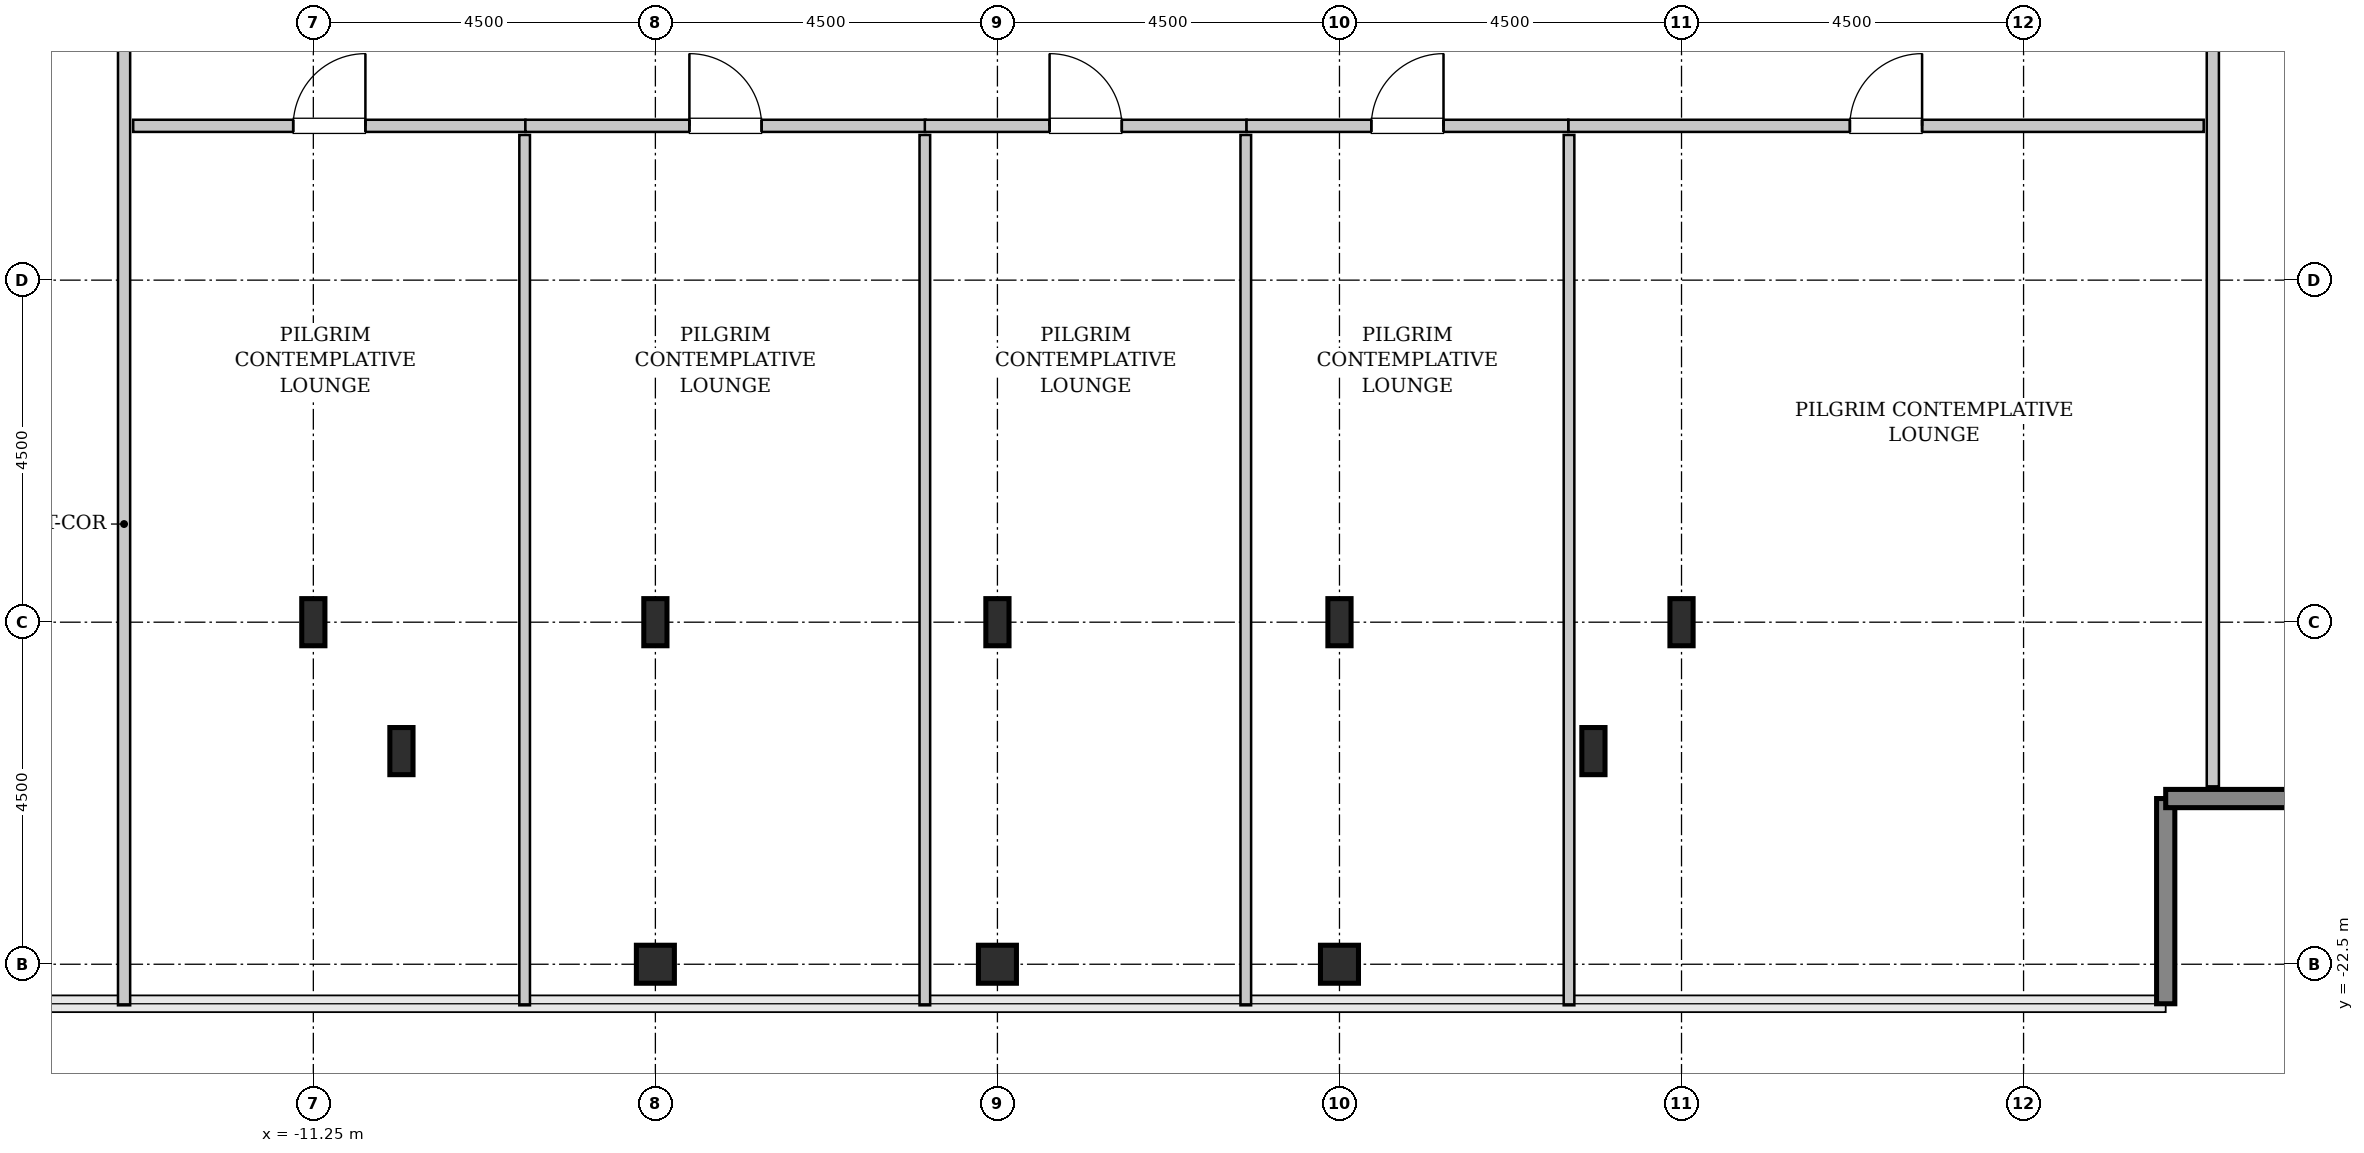
"""IFC4 building model, lengths in metres.
Left out: names, types, materials, properties, quantities, classifications, styles, units other than length and angle.
Written with IfcOpenShell. Run it as: python <this file> out.ifc"""

import sys

from ifc_helpers import new_model, si_unit, direction, frame, frame_2d, origin, origin_2d, place, context, subcontext, project, spatial, rectangle, hollow_rectangle, i_section, extrude, source, transform, mapped, element, fill, save


model = new_model("IFC4")
c1 = context("Model", 3, precision=1e-05, world=origin(), true_north=direction((0.0, 1.0)))
c2 = subcontext(c1, "Body", "Model", "MODEL_VIEW")
j1 = project(units=[si_unit("LENGTHUNIT", "METRE"), si_unit("PLANEANGLEUNIT", "RADIAN")], contexts=[c1])
p1 = place(None, origin())
s1 = spatial("IfcSite", under=j1, at=p1, CompositionType="ELEMENT")
p2 = place(p1, origin())
s2 = spatial("IfcBuilding", under=s1, at=p2, CompositionType="ELEMENT")
p3 = place(p2, frame((0.0, 0.0, 330.0)))
s3 = spatial("IfcBuildingStorey", under=s2, at=p3, CompositionType="ELEMENT", Elevation=330.0)
m1 = source(origin(), c2, "Body", "SweptSolid", [
    extrude(i_section(OverallWidth=0.305, OverallDepth=0.62, WebThickness=0.021, FlangeThickness=0.04, FilletRadius=0.027, at=origin_2d()), origin(), (0.0, 0.0, 1.0), 3.8),
])
for number, where, z_axis, x_axis in (
    (1, (-11.25, -18.0, 0.0), (0.0, 0.0, 1.0), (1.0, 0.0, 0.0)),
    (2, (-10.091, -19.696, 0.0), (0.0, 0.0, 1.0), (1.0, 0.0, 0.0)),
):
    element("IfcColumn", number, at=place(p3, frame(where, z_axis=z_axis, x_axis=x_axis)), inside=s3, PredefinedType="COLUMN", context=c2, shape_type="MappedRepresentation", body=[
        mapped(m1, transform((0.0, 0.0, 0.0), x_axis=(1.0, 0.0, 0.0), y_axis=(0.0, 1.0, 0.0), z_axis=(0.0, 0.0, 1.0), scale=1.0)),
    ])
m2 = source(origin(), c2, "Body", "SweptSolid", [
    extrude(hollow_rectangle(XDim=0.5, YDim=0.5, WallThickness=0.025, InnerFilletRadius=0.025, OuterFilletRadius=0.05, at=origin_2d()), origin(), (0.0, 0.0, 1.0), 3.8),
])
p4 = place(p3, frame((-6.75, -22.5, 0.0), z_axis=(0.0, 0.0, 1.0), x_axis=(1.0, 0.0, 0.0)))
e3 = element("IfcColumn", 3, at=p4, inside=s3, PredefinedType="COLUMN", context=c2, shape_type="MappedRepresentation", body=[
    mapped(m2, transform((0.0, 0.0, 0.0), x_axis=(1.0, 0.0, 0.0), y_axis=(0.0, 1.0, 0.0), z_axis=(0.0, 0.0, 1.0), scale=1.0)),
])
p5 = place(p3, frame((-6.75, -18.0, 0.0), z_axis=(0.0, 0.0, 1.0), x_axis=(1.0, 0.0, 0.0)))
e4 = element("IfcColumn", 4, at=p5, inside=s3, PredefinedType="COLUMN", context=c2, shape_type="MappedRepresentation", body=[
    mapped(m1, transform((0.0, 0.0, 0.0), x_axis=(1.0, 0.0, 0.0), y_axis=(0.0, 1.0, 0.0), z_axis=(0.0, 0.0, 1.0), scale=1.0)),
])
p6 = place(p3, frame((-2.25, -22.5, 0.0), z_axis=(0.0, 0.0, 1.0), x_axis=(1.0, 0.0, 0.0)))
e5 = element("IfcColumn", 5, at=p6, inside=s3, PredefinedType="COLUMN", context=c2, shape_type="MappedRepresentation", body=[
    mapped(m2, transform((0.0, 0.0, 0.0), x_axis=(1.0, 0.0, 0.0), y_axis=(0.0, 1.0, 0.0), z_axis=(0.0, 0.0, 1.0), scale=1.0)),
])
p7 = place(p3, frame((-2.25, -18.0, 0.0), z_axis=(0.0, 0.0, 1.0), x_axis=(1.0, 0.0, 0.0)))
e6 = element("IfcColumn", 6, at=p7, inside=s3, PredefinedType="COLUMN", context=c2, shape_type="MappedRepresentation", body=[
    mapped(m1, transform((0.0, 0.0, 0.0), x_axis=(1.0, 0.0, 0.0), y_axis=(0.0, 1.0, 0.0), z_axis=(0.0, 0.0, 1.0), scale=1.0)),
])
p8 = place(p3, frame((2.25, -22.5, 0.0), z_axis=(0.0, 0.0, 1.0), x_axis=(1.0, 0.0, 0.0)))
e7 = element("IfcColumn", 7, at=p8, inside=s3, PredefinedType="COLUMN", context=c2, shape_type="MappedRepresentation", body=[
    mapped(m2, transform((0.0, 0.0, 0.0), x_axis=(1.0, 0.0, 0.0), y_axis=(0.0, 1.0, 0.0), z_axis=(0.0, 0.0, 1.0), scale=1.0)),
])
for number, where, z_axis, x_axis in (
    (8, (2.25, -18.0, 0.0), (0.0, 0.0, 1.0), (1.0, 0.0, 0.0)),
    (9, (5.591, -19.696, 0.0), (0.0, 0.0, 1.0), (1.0, 0.0, 0.0)),
    (10, (6.75, -18.0, 0.0), (0.0, 0.0, 1.0), (1.0, 0.0, 0.0)),
):
    element("IfcColumn", number, at=place(p3, frame(where, z_axis=z_axis, x_axis=x_axis)), inside=s3, PredefinedType="COLUMN", context=c2, shape_type="MappedRepresentation", body=[
        mapped(m1, transform((0.0, 0.0, 0.0), x_axis=(1.0, 0.0, 0.0), y_axis=(0.0, 1.0, 0.0), z_axis=(0.0, 0.0, 1.0), scale=1.0)),
    ])
m3 = source(origin(), c2, "Body", "SweptSolid", [
    extrude(rectangle(XDim=2.7, YDim=0.24, at=frame_2d((1.35, 0.0))), origin(), (0.0, 0.0, 1.0), 3.55),
])
for number, where, z_axis, x_axis in (
    (11, (13.12, -23.02, 0.0), (0.0, 0.0, 1.0), (0.0, 1.0, 0.0)),
    (12, (13.12, -20.32, 0.0), (0.0, 0.0, 1.0), (1.0, 0.0, 0.0)),
):
    element("IfcWall", number, at=place(p3, frame(where, z_axis=z_axis, x_axis=x_axis)), inside=s3, PredefinedType="SHEAR", context=c2, shape_type="MappedRepresentation", body=[
        mapped(m3, transform((0.0, 0.0, 0.0), x_axis=(1.0, 0.0, 0.0), y_axis=(0.0, 1.0, 0.0), z_axis=(0.0, 0.0, 1.0), scale=1.0)),
    ])
m4 = source(origin(), c2, "Body", "SweptSolid", [
    extrude(rectangle(XDim=14.645, YDim=0.16, at=frame_2d((7.323, 0.0))), origin(), (0.0, 0.0, 1.0), 3.535),
])
p9 = place(p3, frame((-13.74, -23.04, 0.0), z_axis=(0.0, 0.0, 1.0), x_axis=(0.0, 1.0, 0.0)))
e13 = element("IfcWall", 13, at=p9, inside=s3, PredefinedType="PARTITIONING", context=c2, shape_type="MappedRepresentation", body=[
    mapped(m4, transform((0.0, 0.0, 0.0), x_axis=(1.0, 0.0, 0.0), y_axis=(0.0, 1.0, 0.0), z_axis=(0.0, 0.0, 1.0), scale=1.0)),
])
p10 = place(p9, frame((12.613, 0.0, 0.0)))
e14 = element("IfcOpeningElement", 14, at=p10, cuts=e13, PredefinedType="OPENING", context=c2, shape_type="SweptSolid", body=[
    extrude(rectangle(XDim=0.95, YDim=2.1, at=frame_2d((0.475, 1.05))), frame((0.0, 0.09, 0.0), z_axis=(0.0, -1.0, 0.0), x_axis=(1.0, 0.0, 0.0)), (0.0, 0.0, 1.0), 0.18),
])
m5 = source(origin(), c2, "Body", "SweptSolid", [
    extrude(rectangle(XDim=12.365, YDim=0.16, at=frame_2d((6.183, 0.0))), origin(), (0.0, 0.0, 1.0), 3.535),
])
p11 = place(p3, frame((13.74, -20.16, 0.0), z_axis=(0.0, 0.0, 1.0), x_axis=(0.0, 1.0, 0.0)))
e15 = element("IfcWall", 15, at=p11, inside=s3, PredefinedType="PARTITIONING", context=c2, shape_type="MappedRepresentation", body=[
    mapped(m5, transform((0.0, 0.0, 0.0), x_axis=(1.0, 0.0, 0.0), y_axis=(0.0, 1.0, 0.0), z_axis=(0.0, 0.0, 1.0), scale=1.0)),
])
p12 = place(p11, frame((10.032, 0.0, 0.0)))
e16 = element("IfcOpeningElement", 16, at=p12, cuts=e15, PredefinedType="OPENING", context=c2, shape_type="SweptSolid", body=[
    extrude(rectangle(XDim=0.95, YDim=2.1, at=frame_2d((0.475, 1.05))), frame((0.0, 0.09, 0.0), z_axis=(0.0, -1.0, 0.0), x_axis=(1.0, 0.0, 0.0)), (0.0, 0.0, 1.0), 0.18),
])
m6 = source(origin(), c2, "Body", "SweptSolid", [
    extrude(rectangle(XDim=5.16, YDim=0.16, at=frame_2d((2.58, 0.0))), origin(), (0.0, 0.0, 1.0), 3.535),
])
p13 = place(p3, frame((-13.62, -11.47, 0.0), z_axis=(0.0, 0.0, 1.0), x_axis=(1.0, 0.0, 0.0)))
e17 = element("IfcWall", 17, at=p13, inside=s3, PredefinedType="PARTITIONING", context=c2, shape_type="MappedRepresentation", body=[
    mapped(m6, transform((0.0, 0.0, 0.0), x_axis=(1.0, 0.0, 0.0), y_axis=(0.0, 1.0, 0.0), z_axis=(0.0, 0.0, 1.0), scale=1.0)),
])
p14 = place(p13, frame((2.105, 0.0, 0.0)))
e18 = element("IfcOpeningElement", 18, at=p14, cuts=e17, PredefinedType="OPENING", context=c2, shape_type="SweptSolid", body=[
    extrude(rectangle(XDim=0.95, YDim=2.1, at=frame_2d((0.475, 1.05))), frame((0.0, 0.09, 0.0), z_axis=(0.0, -1.0, 0.0), x_axis=(1.0, 0.0, 0.0)), (0.0, 0.0, 1.0), 0.18),
])
m7 = source(origin(), c2, "Body", "SweptSolid", [
    extrude(rectangle(XDim=11.45, YDim=0.14, at=frame_2d((5.725, 0.0))), origin(), (0.0, 0.0, 1.0), 3.535),
])
p15 = place(p3, frame((-8.47, -23.04, 0.0), z_axis=(0.0, 0.0, 1.0), x_axis=(0.0, 1.0, 0.0)))
e19 = element("IfcWall", 19, at=p15, inside=s3, PredefinedType="PARTITIONING", context=c2, shape_type="MappedRepresentation", body=[
    mapped(m7, transform((0.0, 0.0, 0.0), x_axis=(1.0, 0.0, 0.0), y_axis=(0.0, 1.0, 0.0), z_axis=(0.0, 0.0, 1.0), scale=1.0)),
])
m8 = source(origin(), c2, "Body", "SweptSolid", [
    extrude(rectangle(XDim=5.265, YDim=0.16, at=frame_2d((2.632, 0.0))), origin(), (0.0, 0.0, 1.0), 3.535),
])
p16 = place(p3, frame((-8.46, -11.47, 0.0), z_axis=(0.0, 0.0, 1.0), x_axis=(1.0, 0.0, 0.0)))
e20 = element("IfcWall", 20, at=p16, inside=s3, PredefinedType="PARTITIONING", context=c2, shape_type="MappedRepresentation", body=[
    mapped(m8, transform((0.0, 0.0, 0.0), x_axis=(1.0, 0.0, 0.0), y_axis=(0.0, 1.0, 0.0), z_axis=(0.0, 0.0, 1.0), scale=1.0)),
])
p17 = place(p16, frame((2.157, 0.0, 0.0)))
e21 = element("IfcOpeningElement", 21, at=p17, cuts=e20, PredefinedType="OPENING", context=c2, shape_type="SweptSolid", body=[
    extrude(rectangle(XDim=0.95, YDim=2.1, at=frame_2d((0.475, 1.05))), frame((0.0, 0.09, 0.0), z_axis=(0.0, -1.0, 0.0), x_axis=(1.0, 0.0, 0.0)), (0.0, 0.0, 1.0), 0.18),
])
p18 = place(p3, frame((-3.205, -23.04, 0.0), z_axis=(0.0, 0.0, 1.0), x_axis=(0.0, 1.0, 0.0)))
e22 = element("IfcWall", 22, at=p18, inside=s3, PredefinedType="PARTITIONING", context=c2, shape_type="MappedRepresentation", body=[
    mapped(m7, transform((0.0, 0.0, 0.0), x_axis=(1.0, 0.0, 0.0), y_axis=(0.0, 1.0, 0.0), z_axis=(0.0, 0.0, 1.0), scale=1.0)),
])
m9 = source(origin(), c2, "Body", "SweptSolid", [
    extrude(rectangle(XDim=8.36, YDim=0.16, at=frame_2d((4.18, 0.0))), origin(), (0.0, 0.0, 1.0), 3.535),
])
p19 = place(p3, frame((5.26, -11.47, 0.0), z_axis=(0.0, 0.0, 1.0), x_axis=(1.0, 0.0, 0.0)))
e23 = element("IfcWall", 23, at=p19, inside=s3, PredefinedType="PARTITIONING", context=c2, shape_type="MappedRepresentation", body=[
    mapped(m9, transform((0.0, 0.0, 0.0), x_axis=(1.0, 0.0, 0.0), y_axis=(0.0, 1.0, 0.0), z_axis=(0.0, 0.0, 1.0), scale=1.0)),
])
p20 = place(p19, frame((3.705, 0.0, 0.0)))
e24 = element("IfcOpeningElement", 24, at=p20, cuts=e23, PredefinedType="OPENING", context=c2, shape_type="SweptSolid", body=[
    extrude(rectangle(XDim=0.95, YDim=2.1, at=frame_2d((0.475, 1.05))), frame((0.0, 0.09, 0.0), z_axis=(0.0, -1.0, 0.0), x_axis=(1.0, 0.0, 0.0)), (0.0, 0.0, 1.0), 0.18),
])
p21 = place(p3, frame((5.27, -23.04, 0.0), z_axis=(0.0, 0.0, 1.0), x_axis=(0.0, 1.0, 0.0)))
e25 = element("IfcWall", 25, at=p21, inside=s3, PredefinedType="PARTITIONING", context=c2, shape_type="MappedRepresentation", body=[
    mapped(m7, transform((0.0, 0.0, 0.0), x_axis=(1.0, 0.0, 0.0), y_axis=(0.0, 1.0, 0.0), z_axis=(0.0, 0.0, 1.0), scale=1.0)),
])
m10 = source(origin(), c2, "Body", "SweptSolid", [
    extrude(rectangle(XDim=4.233, YDim=0.16, at=frame_2d((2.116, 0.0))), origin(), (0.0, 0.0, 1.0), 3.535),
])
p22 = place(p3, frame((-3.205, -11.47, 0.0), z_axis=(0.0, 0.0, 1.0), x_axis=(1.0, 0.0, 0.0)))
e26 = element("IfcWall", 26, at=p22, inside=s3, PredefinedType="PARTITIONING", context=c2, shape_type="MappedRepresentation", body=[
    mapped(m10, transform((0.0, 0.0, 0.0), x_axis=(1.0, 0.0, 0.0), y_axis=(0.0, 1.0, 0.0), z_axis=(0.0, 0.0, 1.0), scale=1.0)),
])
p23 = place(p22, frame((1.641, 0.0, 0.0)))
e27 = element("IfcOpeningElement", 27, at=p23, cuts=e26, PredefinedType="OPENING", context=c2, shape_type="SweptSolid", body=[
    extrude(rectangle(XDim=0.95, YDim=2.1, at=frame_2d((0.475, 1.05))), frame((0.0, 0.09, 0.0), z_axis=(0.0, -1.0, 0.0), x_axis=(1.0, 0.0, 0.0)), (0.0, 0.0, 1.0), 0.18),
])
p24 = place(p3, frame((1.018, -23.04, 0.0), z_axis=(0.0, 0.0, 1.0), x_axis=(0.0, 1.0, 0.0)))
e28 = element("IfcWall", 28, at=p24, inside=s3, PredefinedType="PARTITIONING", context=c2, shape_type="MappedRepresentation", body=[
    mapped(m7, transform((0.0, 0.0, 0.0), x_axis=(1.0, 0.0, 0.0), y_axis=(0.0, 1.0, 0.0), z_axis=(0.0, 0.0, 1.0), scale=1.0)),
])
m11 = source(origin(), c2, "Body", "SweptSolid", [
    extrude(rectangle(XDim=4.232, YDim=0.16, at=frame_2d((2.116, 0.0))), origin(), (0.0, 0.0, 1.0), 3.535),
])
p25 = place(p3, frame((1.028, -11.47, 0.0), z_axis=(0.0, 0.0, 1.0), x_axis=(1.0, 0.0, 0.0)))
e29 = element("IfcWall", 29, at=p25, inside=s3, PredefinedType="PARTITIONING", context=c2, shape_type="MappedRepresentation", body=[
    mapped(m11, transform((0.0, 0.0, 0.0), x_axis=(1.0, 0.0, 0.0), y_axis=(0.0, 1.0, 0.0), z_axis=(0.0, 0.0, 1.0), scale=1.0)),
])
p26 = place(p25, frame((1.641, 0.0, 0.0)))
e30 = element("IfcOpeningElement", 30, at=p26, cuts=e29, PredefinedType="OPENING", context=c2, shape_type="SweptSolid", body=[
    extrude(rectangle(XDim=0.95, YDim=2.1, at=frame_2d((0.475, 1.05))), frame((0.0, 0.09, 0.0), z_axis=(0.0, -1.0, 0.0), x_axis=(1.0, 0.0, 0.0)), (0.0, 0.0, 1.0), 0.18),
])
m12 = source(origin(), c2, "Body", "SweptSolid", [
    extrude(rectangle(XDim=0.95, YDim=2.1, at=frame_2d((0.475, 1.05))), frame((0.0, 0.025, 0.0), z_axis=(0.0, -1.0, 0.0), x_axis=(1.0, 0.0, 0.0)), (0.0, 0.0, 1.0), 0.05),
])
p27 = place(p14, origin())
e31 = element("IfcDoor", 31, at=p27, inside=s3, OperationType="SINGLE_SWING_RIGHT", PredefinedType="DOOR", context=c2, shape_type="MappedRepresentation", body=[
    mapped(m12, transform((0.0, 0.0, 0.0), x_axis=(1.0, 0.0, 0.0), y_axis=(0.0, 1.0, 0.0), z_axis=(0.0, 0.0, 1.0), scale=1.0)),
])
fill(e18, e31)
p28 = place(p17, origin())
e32 = element("IfcDoor", 32, at=p28, inside=s3, OperationType="SINGLE_SWING_LEFT", PredefinedType="DOOR", context=c2, shape_type="MappedRepresentation", body=[
    mapped(m12, transform((0.0, 0.0, 0.0), x_axis=(1.0, 0.0, 0.0), y_axis=(0.0, 1.0, 0.0), z_axis=(0.0, 0.0, 1.0), scale=1.0)),
])
fill(e21, e32)
p29 = place(p20, origin())
e33 = element("IfcDoor", 33, at=p29, inside=s3, OperationType="SINGLE_SWING_RIGHT", PredefinedType="DOOR", context=c2, shape_type="MappedRepresentation", body=[
    mapped(m12, transform((0.0, 0.0, 0.0), x_axis=(1.0, 0.0, 0.0), y_axis=(0.0, 1.0, 0.0), z_axis=(0.0, 0.0, 1.0), scale=1.0)),
])
fill(e24, e33)
p30 = place(p23, origin())
e34 = element("IfcDoor", 34, at=p30, inside=s3, OperationType="SINGLE_SWING_LEFT", PredefinedType="DOOR", context=c2, shape_type="MappedRepresentation", body=[
    mapped(m12, transform((0.0, 0.0, 0.0), x_axis=(1.0, 0.0, 0.0), y_axis=(0.0, 1.0, 0.0), z_axis=(0.0, 0.0, 1.0), scale=1.0)),
])
fill(e27, e34)
p31 = place(p26, origin())
e35 = element("IfcDoor", 35, at=p31, inside=s3, OperationType="SINGLE_SWING_RIGHT", PredefinedType="DOOR", context=c2, shape_type="MappedRepresentation", body=[
    mapped(m12, transform((0.0, 0.0, 0.0), x_axis=(1.0, 0.0, 0.0), y_axis=(0.0, 1.0, 0.0), z_axis=(0.0, 0.0, 1.0), scale=1.0)),
])
fill(e30, e35)
save(model, sys.argv[1])
